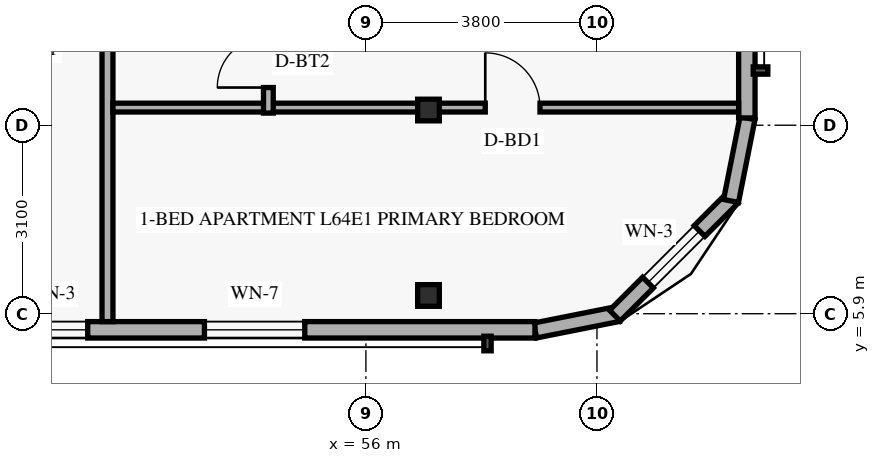
"""IFC4 building model, lengths in metres.
Left out: names, types, materials, properties, quantities, classifications, styles, units other than length and angle.
Written with IfcOpenShell. Run it as: python <this file> out.ifc"""

import sys

from ifc_helpers import new_model, si_unit, direction, frame, frame_2d, origin, origin_2d, place, context, subcontext, project, spatial, rectangle, hollow_rectangle, extrude, element, fill, save


model = new_model("IFC4")
c1 = context("Model", 3, precision=1e-05, world=origin(), true_north=direction((0.0, 1.0)))
c2 = subcontext(c1, "Body", "Model", "MODEL_VIEW")
j1 = project(units=[si_unit("LENGTHUNIT", "METRE"), si_unit("PLANEANGLEUNIT", "RADIAN")], contexts=[c1])
p1 = place(None, origin())
s1 = spatial("IfcSite", under=j1, at=p1, CompositionType="ELEMENT")
p2 = place(p1, origin())
s2 = spatial("IfcBuilding", under=s1, at=p2, CompositionType="ELEMENT")
p3 = place(p2, frame((0.0, 0.0, 246.0)))
s3 = spatial("IfcBuildingStorey", under=s2, at=p3, CompositionType="ELEMENT", Elevation=246.0)
for number, where, z_axis, x_axis in (
    (1, (56.925, 6.2, 0.0), (0.058, 0.0, 0.998), (0.0, 1.0, 0.0)),
    (2, (56.925, 9.25, 0.0), (0.058, 0.0, 0.998), (0.0, 1.0, 0.0)),
):
    element("IfcColumn", number, at=place(p3, frame(where, z_axis=z_axis, x_axis=x_axis)), inside=s3, PredefinedType="COLUMN", context=c2, shape_type="SweptSolid", body=[
        extrude(hollow_rectangle(XDim=0.356, YDim=0.356, WallThickness=0.016, at=origin_2d()), origin(), (0.0, 0.0, 1.0), 3.606),
    ])
p4 = place(p3, frame((58.783, 5.624, 0.0), z_axis=(0.0, 0.0, 1.0), x_axis=(0.980809899341, 0.19496651342, 0.0)))
e3 = element("IfcWall", 3, at=p4, inside=s3, PredefinedType="SOLIDWALL", context=c2, shape_type="SweptSolid", body=[
    extrude(rectangle(XDim=1.389, YDim=0.25, at=frame_2d((0.694, 0.0))), origin(), (0.0, 0.0, 1.0), 3.36),
])
p5 = place(p3, frame((60.095, 5.868, 0.0), z_axis=(0.0, 0.0, 1.0), x_axis=(0.707106781187, 0.707106781187, 0.0)))
e4 = element("IfcWall", 4, at=p5, inside=s3, PredefinedType="SOLIDWALL", context=c2, shape_type="SweptSolid", body=[
    extrude(rectangle(XDim=2.739, YDim=0.25, at=frame_2d((1.37, 0.0))), origin(), (0.0, 0.0, 1.0), 3.36),
])
p6 = place(p5, frame((0.77, 0.0, 0.85)))
e5 = element("IfcOpeningElement", 5, at=p6, cuts=e4, PredefinedType="OPENING", context=c2, shape_type="SweptSolid", body=[
    extrude(rectangle(XDim=1.2, YDim=1.5, at=frame_2d((0.6, 0.75))), frame((0.0, 0.135, 0.0), z_axis=(0.0, -1.0, 0.0), x_axis=(1.0, 0.0, 0.0)), (0.0, 0.0, 1.0), 0.27),
])
p7 = place(p3, frame((62.005, 7.754, 0.0), z_axis=(0.0, 0.0, 1.0), x_axis=(0.195135625965, 0.9807762678, 0.0)))
e6 = element("IfcWall", 6, at=p7, inside=s3, PredefinedType="SOLIDWALL", context=c2, shape_type="SweptSolid", body=[
    extrude(rectangle(XDim=1.389, YDim=0.25, at=frame_2d((0.694, 0.0))), origin(), (0.0, 0.0, 1.0), 3.36),
])
p8 = place(p3, frame((25.82, 5.635, 0.0), z_axis=(0.0, 0.0, 1.0), x_axis=(1.0, 0.0, 0.0)))
e7 = element("IfcWall", 7, at=p8, inside=s3, PredefinedType="SOLIDWALL", context=c2, shape_type="SweptSolid", body=[
    extrude(rectangle(XDim=32.96, YDim=0.27, at=frame_2d((16.48, 0.0))), origin(), (0.0, 0.0, 1.0), 3.36),
])
p9 = place(p8, frame((3.645, 0.0, 0.85)))
e8 = element("IfcOpeningElement", 8, at=p9, cuts=e7, PredefinedType="OPENING", context=c2, shape_type="SweptSolid", body=[
    extrude(rectangle(XDim=1.65, YDim=1.6, at=frame_2d((0.825, 0.8))), frame((0.0, 0.145, 0.0), z_axis=(0.0, -1.0, 0.0), x_axis=(1.0, 0.0, 0.0)), (0.0, 0.0, 1.0), 0.29),
])
p10 = place(p8, frame((19.402, 0.0, 0.85)))
e9 = element("IfcOpeningElement", 9, at=p10, cuts=e7, PredefinedType="OPENING", context=c2, shape_type="SweptSolid", body=[
    extrude(rectangle(XDim=1.65, YDim=1.6, at=frame_2d((0.825, 0.8))), frame((0.0, 0.145, 0.0), z_axis=(0.0, -1.0, 0.0), x_axis=(1.0, 0.0, 0.0)), (0.0, 0.0, 1.0), 0.29),
])
p11 = place(p8, frame((24.405, 0.0, 0.85)))
e10 = element("IfcOpeningElement", 10, at=p11, cuts=e7, PredefinedType="OPENING", context=c2, shape_type="SweptSolid", body=[
    extrude(rectangle(XDim=1.2, YDim=1.5, at=frame_2d((0.6, 0.75))), frame((0.0, 0.145, 0.0), z_axis=(0.0, -1.0, 0.0), x_axis=(1.0, 0.0, 0.0)), (0.0, 0.0, 1.0), 0.29),
])
p12 = place(p8, frame((27.525, 0.0, 0.85)))
e11 = element("IfcOpeningElement", 11, at=p12, cuts=e7, PredefinedType="OPENING", context=c2, shape_type="SweptSolid", body=[
    extrude(rectangle(XDim=1.65, YDim=1.6, at=frame_2d((0.825, 0.8))), frame((0.0, 0.145, 0.0), z_axis=(0.0, -1.0, 0.0), x_axis=(1.0, 0.0, 0.0)), (0.0, 0.0, 1.0), 0.29),
])
p13 = place(p3, frame((62.265, 9.12, 0.0), z_axis=(0.0, 0.0, 1.0), x_axis=(0.0, 1.0, 0.0)))
e12 = element("IfcWall", 12, at=p13, inside=s3, PredefinedType="SOLIDWALL", context=c2, shape_type="SweptSolid", body=[
    extrude(rectangle(XDim=12.91, YDim=0.27, at=frame_2d((6.455, 0.0))), origin(), (0.0, 0.0, 1.0), 3.36),
])
p14 = place(p13, frame((3.125, 0.0, 0.85)))
e13 = element("IfcOpeningElement", 13, at=p14, cuts=e12, PredefinedType="OPENING", context=c2, shape_type="SweptSolid", body=[
    extrude(rectangle(XDim=1.5, YDim=1.55, at=frame_2d((0.75, 0.775))), frame((0.0, 0.145, 0.0), z_axis=(0.0, -1.0, 0.0), x_axis=(1.0, 0.0, 0.0)), (0.0, 0.0, 1.0), 0.29),
])
p15 = place(p13, frame((9.579, 0.0, 0.85)))
e14 = element("IfcOpeningElement", 14, at=p15, cuts=e12, PredefinedType="OPENING", context=c2, shape_type="SweptSolid", body=[
    extrude(rectangle(XDim=1.5, YDim=1.55, at=frame_2d((0.75, 0.775))), frame((0.0, 0.145, 0.0), z_axis=(0.0, -1.0, 0.0), x_axis=(1.0, 0.0, 0.0)), (0.0, 0.0, 1.0), 0.29),
])
p16 = place(p3, frame((51.75, 5.77, 0.0), z_axis=(0.0, 0.0, 1.0), x_axis=(0.0, 1.0, 0.0)))
e15 = element("IfcWall", 15, at=p16, inside=s3, PredefinedType="STANDARD", context=c2, shape_type="SweptSolid", body=[
    extrude(rectangle(XDim=36.46, YDim=0.18, at=frame_2d((18.23, 0.0))), origin(), (0.0, 0.0, 1.0), 2.803),
])
p17 = place(p16, frame((8.559, 0.0, 0.0)))
e16 = element("IfcOpeningElement", 16, at=p17, cuts=e15, PredefinedType="OPENING", context=c2, shape_type="SweptSolid", body=[
    extrude(rectangle(XDim=0.92, YDim=2.15, at=frame_2d((0.46, 1.075))), frame((0.0, 0.1, 0.0), z_axis=(0.0, -1.0, 0.0), x_axis=(1.0, 0.0, 0.0)), (0.0, 0.0, 1.0), 0.2),
])
p18 = place(p16, frame((26.933, 0.0, 0.0)))
e17 = element("IfcOpeningElement", 17, at=p18, cuts=e15, PredefinedType="OPENING", context=c2, shape_type="SweptSolid", body=[
    extrude(rectangle(XDim=0.92, YDim=2.15, at=frame_2d((0.46, 1.075))), frame((0.0, 0.1, 0.0), z_axis=(0.0, -1.0, 0.0), x_axis=(1.0, 0.0, 0.0)), (0.0, 0.0, 1.0), 0.2),
])
p19 = place(p3, frame((51.84, 9.29, 0.0), z_axis=(0.0, 0.0, 1.0), x_axis=(1.0, 0.0, 0.0)))
e18 = element("IfcWall", 18, at=p19, inside=s3, PredefinedType="PARTITIONING", context=c2, shape_type="SweptSolid", body=[
    extrude(rectangle(XDim=10.29, YDim=0.145, at=frame_2d((5.145, 0.0))), origin(), (0.0, 0.0, 1.0), 2.803),
])
p20 = place(p19, frame((6.123, 0.0, 0.0)))
e19 = element("IfcOpeningElement", 19, at=p20, cuts=e18, PredefinedType="OPENING", context=c2, shape_type="SweptSolid", body=[
    extrude(rectangle(XDim=0.9, YDim=2.14, at=frame_2d((0.45, 1.07))), frame((0.0, 0.083, 0.0), z_axis=(0.0, -1.0, 0.0), x_axis=(1.0, 0.0, 0.0)), (0.0, 0.0, 1.0), 0.165),
])
p21 = place(p3, frame((54.396, 9.2, 0.0), z_axis=(0.0, 0.0, 1.0), x_axis=(0.0, 1.0, 0.0)))
e20 = element("IfcWall", 20, at=p21, inside=s3, PredefinedType="PLUMBINGWALL", context=c2, shape_type="SweptSolid", body=[
    extrude(rectangle(XDim=4.859, YDim=0.16, at=frame_2d((2.429, 0.0))), origin(), (0.0, 0.0, 1.0), 2.803),
])
p22 = place(p21, frame((0.42, 0.0, 0.0)))
e21 = element("IfcOpeningElement", 21, at=p22, cuts=e20, PredefinedType="OPENING", context=c2, shape_type="SweptSolid", body=[
    extrude(rectangle(XDim=0.84, YDim=2.12, at=frame_2d((0.42, 1.06))), frame((0.0, 0.09, 0.0), z_axis=(0.0, -1.0, 0.0), x_axis=(1.0, 0.0, 0.0)), (0.0, 0.0, 1.0), 0.18),
])
p23 = place(p21, frame((2.572, 0.0, 0.0)))
e22 = element("IfcOpeningElement", 22, at=p23, cuts=e20, PredefinedType="OPENING", context=c2, shape_type="SweptSolid", body=[
    extrude(rectangle(XDim=0.88, YDim=2.12, at=frame_2d((0.44, 1.06))), frame((0.0, 0.09, 0.0), z_axis=(0.0, -1.0, 0.0), x_axis=(1.0, 0.0, 0.0)), (0.0, 0.0, 1.0), 0.18),
])
p24 = place(p6, origin())
e23 = element("IfcWindow", 23, at=p24, inside=s3, PartitioningType="SINGLE_PANEL", PredefinedType="WINDOW", context=c2, shape_type="SweptSolid", body=[
    extrude(rectangle(XDim=1.2, YDim=1.5, at=frame_2d((0.6, 0.75))), frame((0.0, 0.03, 0.0), z_axis=(0.0, -1.0, 0.0), x_axis=(1.0, 0.0, 0.0)), (0.0, 0.0, 1.0), 0.06),
])
fill(e5, e23)
p25 = place(p11, origin())
e24 = element("IfcWindow", 24, at=p25, inside=s3, PartitioningType="SINGLE_PANEL", PredefinedType="WINDOW", context=c2, shape_type="SweptSolid", body=[
    extrude(rectangle(XDim=1.2, YDim=1.5, at=frame_2d((0.6, 0.75))), frame((0.0, 0.03, 0.0), z_axis=(0.0, -1.0, 0.0), x_axis=(1.0, 0.0, 0.0)), (0.0, 0.0, 1.0), 0.06),
])
fill(e10, e24)
p26 = place(p12, origin())
e25 = element("IfcWindow", 25, at=p26, inside=s3, PartitioningType="SINGLE_PANEL", PredefinedType="WINDOW", context=c2, shape_type="SweptSolid", body=[
    extrude(rectangle(XDim=1.65, YDim=1.6, at=frame_2d((0.825, 0.8))), frame((0.0, 0.03, 0.0), z_axis=(0.0, -1.0, 0.0), x_axis=(1.0, 0.0, 0.0)), (0.0, 0.0, 1.0), 0.06),
])
fill(e11, e25)
p27 = place(p22, origin())
e26 = element("IfcDoor", 26, at=p27, inside=s3, OperationType="SINGLE_SWING_LEFT", PredefinedType="DOOR", context=c2, shape_type="SweptSolid", body=[
    extrude(rectangle(XDim=0.84, YDim=2.12, at=frame_2d((0.42, 1.06))), frame((0.0, 0.025, 0.0), z_axis=(0.0, -1.0, 0.0), x_axis=(1.0, 0.0, 0.0)), (0.0, 0.0, 1.0), 0.05),
])
fill(e21, e26)
p28 = place(p20, origin())
e27 = element("IfcDoor", 27, at=p28, inside=s3, OperationType="SINGLE_SWING_LEFT", PredefinedType="DOOR", context=c2, shape_type="SweptSolid", body=[
    extrude(rectangle(XDim=0.9, YDim=2.14, at=frame_2d((0.45, 1.07))), frame((0.0, 0.025, 0.0), z_axis=(0.0, -1.0, 0.0), x_axis=(1.0, 0.0, 0.0)), (0.0, 0.0, 1.0), 0.05),
])
fill(e19, e27)
save(model, sys.argv[1])
